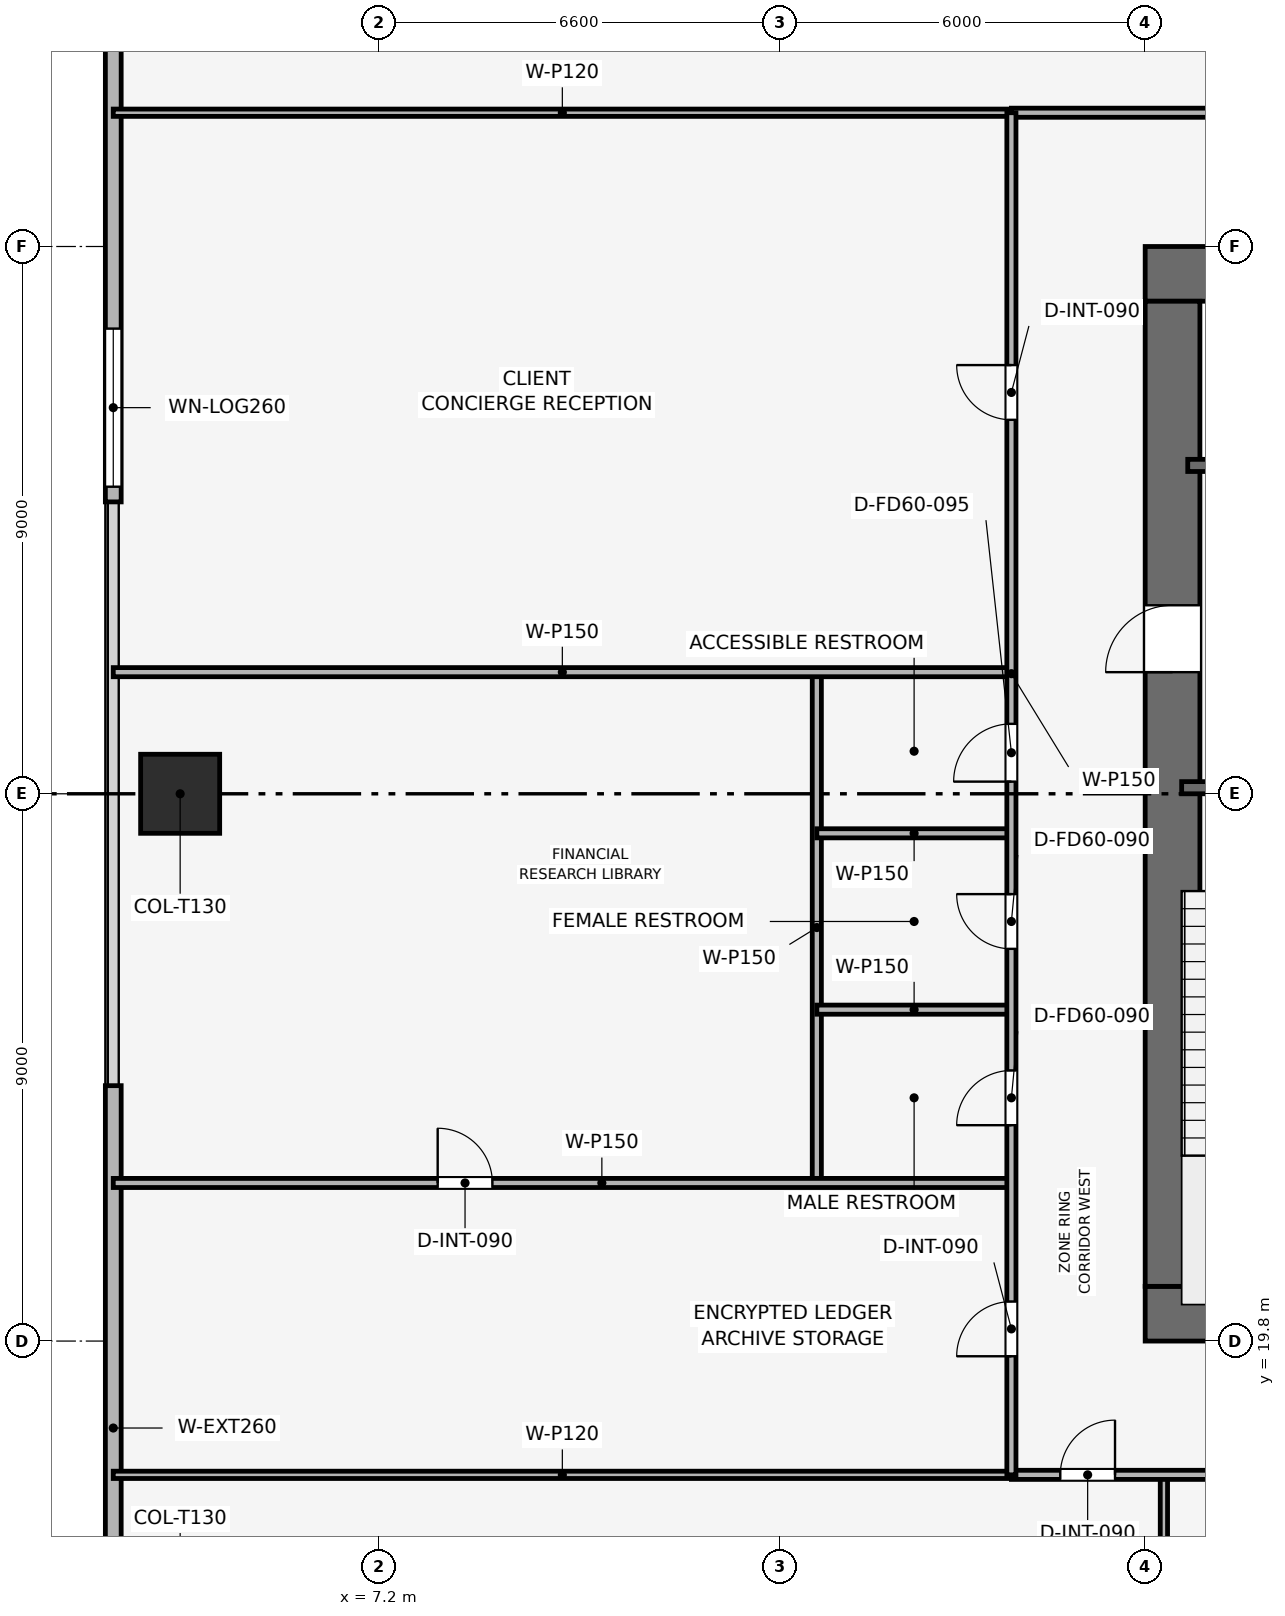
"""IFC4 building model, lengths in metres.
Left out: names, types, materials, properties, quantities, classifications, styles, units other than length and angle.
Written with IfcOpenShell. Run it as: python <this file> out.ifc"""

import sys

from ifc_helpers import new_model, si_unit, direction, frame, frame_2d, origin, origin_2d, place, context, subcontext, project, spatial, rectangle, extrude, element, fill, save


model = new_model("IFC4")
c1 = context("Model", 3, precision=1e-05, world=origin(), true_north=direction((0.0, 1.0)))
c2 = subcontext(c1, "Body", "Model", "MODEL_VIEW")
j1 = project(units=[si_unit("LENGTHUNIT", "METRE"), si_unit("PLANEANGLEUNIT", "RADIAN")], contexts=[c1])
p1 = place(None, origin())
s1 = spatial("IfcSite", under=j1, at=p1, CompositionType="ELEMENT")
p2 = place(p1, origin())
s2 = spatial("IfcBuilding", under=s1, at=p2, CompositionType="ELEMENT")
p3 = place(p2, frame((0.0, 0.0, 132.9)))
s3 = spatial("IfcBuildingStorey", under=s2, at=p3, CompositionType="ELEMENT", Elevation=132.9)
p4 = place(p3, frame((19.8, 20.25, 0.0), z_axis=(0.0, 0.0, 1.0), x_axis=(1.0, 0.0, 0.0)))
e1 = element("IfcWall", 1, at=p4, inside=s3, PredefinedType="SHEAR", context=c2, shape_type="SweptSolid", body=[
    extrude(rectangle(XDim=18.0, YDim=0.9, at=frame_2d((9.0, 0.0))), origin(), (0.0, 0.0, 1.0), 5.4),
])
p5 = place(p4, frame((8.4, 0.0, 0.0)))
e2 = element("IfcOpeningElement", 2, at=p5, cuts=e1, PredefinedType="OPENING", context=c2, shape_type="SweptSolid", body=[
    extrude(rectangle(XDim=1.2, YDim=2.2, at=frame_2d((0.6, 1.1))), frame((0.0, 0.46, 0.0), z_axis=(0.0, -1.0, 0.0), x_axis=(1.0, 0.0, 0.0)), (0.0, 0.0, 1.0), 0.92),
])
p6 = place(p3, frame((19.8, 37.35, 0.0), z_axis=(0.0, 0.0, 1.0), x_axis=(1.0, 0.0, 0.0)))
e3 = element("IfcWall", 3, at=p6, inside=s3, PredefinedType="SHEAR", context=c2, shape_type="SweptSolid", body=[
    extrude(rectangle(XDim=18.0, YDim=0.9, at=frame_2d((9.0, 0.0))), origin(), (0.0, 0.0, 1.0), 5.4),
])
p7 = place(p6, frame((7.05, 0.0, 0.0)))
e4 = element("IfcOpeningElement", 4, at=p7, cuts=e3, PredefinedType="OPENING", context=c2, shape_type="SweptSolid", body=[
    extrude(rectangle(XDim=1.1, YDim=2.15, at=frame_2d((0.55, 1.075))), frame((0.0, 0.46, 0.0), z_axis=(0.0, -1.0, 0.0), x_axis=(1.0, 0.0, 0.0)), (0.0, 0.0, 1.0), 0.92),
])
p8 = place(p3, frame((20.25, 20.7, 0.0), z_axis=(0.0, 0.0, 1.0), x_axis=(0.0, 1.0, 0.0)))
e5 = element("IfcWall", 5, at=p8, inside=s3, PredefinedType="SHEAR", context=c2, shape_type="SweptSolid", body=[
    extrude(rectangle(XDim=16.2, YDim=0.9, at=frame_2d((8.1, 0.0))), origin(), (0.0, 0.0, 1.0), 5.4),
])
p9 = place(p8, frame((10.1, 0.0, 0.0)))
e6 = element("IfcOpeningElement", 6, at=p9, cuts=e5, PredefinedType="OPENING", context=c2, shape_type="SweptSolid", body=[
    extrude(rectangle(XDim=1.1, YDim=2.15, at=frame_2d((0.55, 1.075))), frame((0.0, 0.46, 0.0), z_axis=(0.0, -1.0, 0.0), x_axis=(1.0, 0.0, 0.0)), (0.0, 0.0, 1.0), 0.92),
])
p10 = place(p3, frame((3.93, 28.8, 0.09), z_axis=(0.316171863562, 0.0, 0.948701930372), x_axis=(0.0, 1.0, 0.0)))
e7 = element("IfcColumn", 7, at=p10, inside=s3, PredefinedType="COLUMN", context=c2, shape_type="SweptSolid", body=[
    extrude(rectangle(XDim=1.3, YDim=1.3, at=origin_2d()), origin(), (0.0, 0.0, 1.0), 5.241),
])
p11 = place(p3, frame((2.83, 9.9, 0.0), z_axis=(0.0, 0.0, 1.0), x_axis=(0.0, 1.0, 0.0)))
e8 = element("IfcWall", 8, at=p11, inside=s3, PredefinedType="SOLIDWALL", context=c2, shape_type="SweptSolid", body=[
    extrude(rectangle(XDim=14.1, YDim=0.26, at=frame_2d((7.05, 0.0))), origin(), (0.0, 0.0, 1.0), 5.145),
])
p12 = place(p11, frame((0.25, 0.0, 0.9)))
e9 = element("IfcOpeningElement", 9, at=p12, cuts=e8, PredefinedType="OPENING", context=c2, shape_type="SweptSolid", body=[
    extrude(rectangle(XDim=2.6, YDim=2.2, at=frame_2d((1.3, 1.1))), frame((0.0, 0.14, 0.0), z_axis=(0.0, -1.0, 0.0), x_axis=(1.0, 0.0, 0.0)), (0.0, 0.0, 1.0), 0.28),
])
p13 = place(p3, frame((2.83, 33.6, 0.0), z_axis=(0.0, 0.0, 1.0), x_axis=(0.0, 1.0, 0.0)))
e10 = element("IfcWall", 10, at=p13, inside=s3, PredefinedType="SOLIDWALL", context=c2, shape_type="SweptSolid", body=[
    extrude(rectangle(XDim=14.1, YDim=0.26, at=frame_2d((7.05, 0.0))), origin(), (0.0, 0.0, 1.0), 5.145),
])
p14 = place(p13, frame((0.25, 0.0, 0.9)))
e11 = element("IfcOpeningElement", 11, at=p14, cuts=e10, PredefinedType="OPENING", context=c2, shape_type="SweptSolid", body=[
    extrude(rectangle(XDim=2.6, YDim=2.2, at=frame_2d((1.3, 1.1))), frame((0.0, 0.14, 0.0), z_axis=(0.0, -1.0, 0.0), x_axis=(1.0, 0.0, 0.0)), (0.0, 0.0, 1.0), 0.28),
])
p15 = place(p3, frame((20.4, 28.9, 0.0), z_axis=(0.0, 0.0, 1.0), x_axis=(1.0, 0.0, 0.0)))
e12 = element("IfcWall", 12, at=p15, inside=s3, PredefinedType="SHEAR", context=c2, shape_type="SweptSolid", body=[
    extrude(rectangle(XDim=3.15, YDim=0.2, at=frame_2d((1.575, 0.0))), origin(), (0.0, 0.0, 1.0), 5.145),
])
p16 = place(p15, frame((0.8, 0.0, 0.0)))
e13 = element("IfcOpeningElement", 13, at=p16, cuts=e12, PredefinedType="OPENING", context=c2, shape_type="SweptSolid", body=[
    extrude(rectangle(XDim=1.0, YDim=2.1, at=frame_2d((0.5, 1.05))), frame((0.0, 0.11, 0.0), z_axis=(0.0, -1.0, 0.0), x_axis=(1.0, 0.0, 0.0)), (0.0, 0.0, 1.0), 0.22),
])
p17 = place(p3, frame((20.5, 34.2, 0.0), z_axis=(0.0, 0.0, 1.0), x_axis=(1.0, 0.0, 0.0)))
e14 = element("IfcWall", 14, at=p17, inside=s3, PredefinedType="SHEAR", context=c2, shape_type="SweptSolid", body=[
    extrude(rectangle(XDim=3.05, YDim=0.2, at=frame_2d((1.525, 0.0))), origin(), (0.0, 0.0, 1.0), 5.145),
])
p18 = place(p17, frame((0.75, 0.0, 0.0)))
e15 = element("IfcOpeningElement", 15, at=p18, cuts=e14, PredefinedType="OPENING", context=c2, shape_type="SweptSolid", body=[
    extrude(rectangle(XDim=1.1, YDim=2.15, at=frame_2d((0.55, 1.075))), frame((0.0, 0.11, 0.0), z_axis=(0.0, -1.0, 0.0), x_axis=(1.0, 0.0, 0.0)), (0.0, 0.0, 1.0), 0.22),
])
for number, where, z_axis, x_axis in (
    (16, (20.108, 2.83, 0.0), (0.0, 0.0, 1.0), (0.0, 1.0, 0.0)),
    (17, (2.83, 17.6, 0.0), (0.0, 0.0, 1.0), (1.0, 0.0, 0.0)),
    (18, (2.83, 40.0, 0.0), (0.0, 0.0, 1.0), (1.0, 0.0, 0.0)),
):
    element("IfcWall", number, at=place(p3, frame(where, z_axis=z_axis, x_axis=x_axis)), inside=s3, PredefinedType="PARTITIONING", context=c2, shape_type="SweptSolid", body=[
        extrude(rectangle(XDim=14.77, YDim=0.12, at=frame_2d((7.385, 0.0))), origin(), (0.0, 0.0, 1.0), 4.63),
    ])
p19 = place(p3, frame((14.4, 22.4, 0.0), z_axis=(0.0, 0.0, 1.0), x_axis=(0.0, 1.0, 0.0)))
e19 = element("IfcWall", 19, at=p19, inside=s3, PredefinedType="PARTITIONING", context=c2, shape_type="SweptSolid", body=[
    extrude(rectangle(XDim=8.4, YDim=0.15, at=frame_2d((4.2, 0.0))), origin(), (0.0, 0.0, 1.0), 4.68),
])
p20 = place(p3, frame((2.83, 22.4, 0.0), z_axis=(0.0, 0.0, 1.0), x_axis=(1.0, 0.0, 0.0)))
e20 = element("IfcWall", 20, at=p20, inside=s3, PredefinedType="PARTITIONING", context=c2, shape_type="SweptSolid", body=[
    extrude(rectangle(XDim=14.77, YDim=0.15, at=frame_2d((7.385, 0.0))), origin(), (0.0, 0.0, 1.0), 4.63),
])
p21 = place(p20, frame((5.335, 0.0, 0.0)))
e21 = element("IfcOpeningElement", 21, at=p21, cuts=e20, PredefinedType="OPENING", context=c2, shape_type="SweptSolid", body=[
    extrude(rectangle(XDim=0.9, YDim=2.1, at=frame_2d((0.45, 1.05))), frame((0.0, 0.085, 0.0), z_axis=(0.0, -1.0, 0.0), x_axis=(1.0, 0.0, 0.0)), (0.0, 0.0, 1.0), 0.17),
])
p22 = place(p3, frame((2.83, 30.8, 0.0), z_axis=(0.0, 0.0, 1.0), x_axis=(1.0, 0.0, 0.0)))
e22 = element("IfcWall", 22, at=p22, inside=s3, PredefinedType="PARTITIONING", context=c2, shape_type="SweptSolid", body=[
    extrude(rectangle(XDim=14.77, YDim=0.15, at=frame_2d((7.385, 0.0))), origin(), (0.0, 0.0, 1.0), 4.63),
])
for number, where, z_axis, x_axis in (
    (23, (14.4, 25.25, 0.0), (0.0, 0.0, 1.0), (1.0, 0.0, 0.0)),
    (24, (14.4, 28.15, 0.0), (0.0, 0.0, 1.0), (1.0, 0.0, 0.0)),
):
    element("IfcWall", number, at=place(p3, frame(where, z_axis=z_axis, x_axis=x_axis)), inside=s3, PredefinedType="PARTITIONING", context=c2, shape_type="SweptSolid", body=[
        extrude(rectangle(XDim=3.2, YDim=0.15, at=frame_2d((1.6, 0.0))), origin(), (0.0, 0.0, 1.0), 4.77),
    ])
p23 = place(p3, frame((17.6, 17.6, 0.0), z_axis=(0.0, 0.0, 1.0), x_axis=(1.0, 0.0, 0.0)))
e25 = element("IfcWall", 25, at=p23, inside=s3, PredefinedType="PARTITIONING", context=c2, shape_type="SweptSolid", body=[
    extrude(rectangle(XDim=22.4, YDim=0.15, at=frame_2d((11.2, 0.0))), origin(), (0.0, 0.0, 1.0), 4.68),
])
p24 = place(p23, frame((0.804, 0.0, 0.0)))
e26 = element("IfcOpeningElement", 26, at=p24, cuts=e25, PredefinedType="OPENING", context=c2, shape_type="SweptSolid", body=[
    extrude(rectangle(XDim=0.9, YDim=2.1, at=frame_2d((0.45, 1.05))), frame((0.0, 0.085, 0.0), z_axis=(0.0, -1.0, 0.0), x_axis=(1.0, 0.0, 0.0)), (0.0, 0.0, 1.0), 0.17),
])
p25 = place(p23, frame((6.424, 0.0, 0.0)))
e27 = element("IfcOpeningElement", 27, at=p25, cuts=e25, PredefinedType="OPENING", context=c2, shape_type="SweptSolid", body=[
    extrude(rectangle(XDim=0.9, YDim=2.1, at=frame_2d((0.45, 1.05))), frame((0.0, 0.085, 0.0), z_axis=(0.0, -1.0, 0.0), x_axis=(1.0, 0.0, 0.0)), (0.0, 0.0, 1.0), 0.17),
])
p26 = place(p23, frame((16.369, 0.0, 0.0)))
e28 = element("IfcOpeningElement", 28, at=p26, cuts=e25, PredefinedType="OPENING", context=c2, shape_type="SweptSolid", body=[
    extrude(rectangle(XDim=0.9, YDim=2.1, at=frame_2d((0.45, 1.05))), frame((0.0, 0.085, 0.0), z_axis=(0.0, -1.0, 0.0), x_axis=(1.0, 0.0, 0.0)), (0.0, 0.0, 1.0), 0.17),
])
p27 = place(p3, frame((17.6, 40.0, 0.0), z_axis=(0.0, 0.0, 1.0), x_axis=(1.0, 0.0, 0.0)))
e29 = element("IfcWall", 29, at=p27, inside=s3, PredefinedType="PARTITIONING", context=c2, shape_type="SweptSolid", body=[
    extrude(rectangle(XDim=22.4, YDim=0.15, at=frame_2d((11.2, 0.0))), origin(), (0.0, 0.0, 1.0), 4.68),
])
p28 = place(p27, frame((10.75, 0.0, 0.0)))
e30 = element("IfcOpeningElement", 30, at=p28, cuts=e29, PredefinedType="OPENING", context=c2, shape_type="SweptSolid", body=[
    extrude(rectangle(XDim=0.9, YDim=2.1, at=frame_2d((0.45, 1.05))), frame((0.0, 0.085, 0.0), z_axis=(0.0, -1.0, 0.0), x_axis=(1.0, 0.0, 0.0)), (0.0, 0.0, 1.0), 0.17),
])
p29 = place(p3, frame((17.6, 17.6, 0.0), z_axis=(0.0, 0.0, 1.0), x_axis=(0.0, 1.0, 0.0)))
e31 = element("IfcWall", 31, at=p29, inside=s3, PredefinedType="PARTITIONING", context=c2, shape_type="SweptSolid", body=[
    extrude(rectangle(XDim=22.4, YDim=0.15, at=frame_2d((11.2, 0.0))), origin(), (0.0, 0.0, 1.0), 4.68),
])
p30 = place(p29, frame((1.95, 0.0, 0.0)))
e32 = element("IfcOpeningElement", 32, at=p30, cuts=e31, PredefinedType="OPENING", context=c2, shape_type="SweptSolid", body=[
    extrude(rectangle(XDim=0.9, YDim=2.1, at=frame_2d((0.45, 1.05))), frame((0.0, 0.085, 0.0), z_axis=(0.0, -1.0, 0.0), x_axis=(1.0, 0.0, 0.0)), (0.0, 0.0, 1.0), 0.17),
])
p31 = place(p29, frame((5.75, 0.0, 0.0)))
e33 = element("IfcOpeningElement", 33, at=p31, cuts=e31, PredefinedType="OPENING", context=c2, shape_type="SweptSolid", body=[
    extrude(rectangle(XDim=0.9, YDim=2.1, at=frame_2d((0.45, 1.05))), frame((0.0, 0.085, 0.0), z_axis=(0.0, -1.0, 0.0), x_axis=(1.0, 0.0, 0.0)), (0.0, 0.0, 1.0), 0.17),
])
p32 = place(p29, frame((8.65, 0.0, 0.0)))
e34 = element("IfcOpeningElement", 34, at=p32, cuts=e31, PredefinedType="OPENING", context=c2, shape_type="SweptSolid", body=[
    extrude(rectangle(XDim=0.9, YDim=2.1, at=frame_2d((0.45, 1.05))), frame((0.0, 0.085, 0.0), z_axis=(0.0, -1.0, 0.0), x_axis=(1.0, 0.0, 0.0)), (0.0, 0.0, 1.0), 0.17),
])
p33 = place(p29, frame((11.4, 0.0, 0.0)))
e35 = element("IfcOpeningElement", 35, at=p33, cuts=e31, PredefinedType="OPENING", context=c2, shape_type="SweptSolid", body=[
    extrude(rectangle(XDim=0.95, YDim=2.1, at=frame_2d((0.475, 1.05))), frame((0.0, 0.085, 0.0), z_axis=(0.0, -1.0, 0.0), x_axis=(1.0, 0.0, 0.0)), (0.0, 0.0, 1.0), 0.17),
])
p34 = place(p29, frame((17.35, 0.0, 0.0)))
e36 = element("IfcOpeningElement", 36, at=p34, cuts=e31, PredefinedType="OPENING", context=c2, shape_type="SweptSolid", body=[
    extrude(rectangle(XDim=0.9, YDim=2.1, at=frame_2d((0.45, 1.05))), frame((0.0, 0.085, 0.0), z_axis=(0.0, -1.0, 0.0), x_axis=(1.0, 0.0, 0.0)), (0.0, 0.0, 1.0), 0.17),
])
p35 = place(p14, origin())
e37 = element("IfcWindow", 37, at=p35, inside=s3, PartitioningType="SINGLE_PANEL", PredefinedType="WINDOW", context=c2, shape_type="SweptSolid", body=[
    extrude(rectangle(XDim=2.6, YDim=2.2, at=frame_2d((1.3, 1.1))), frame((0.0, 0.03, 0.0), z_axis=(0.0, -1.0, 0.0), x_axis=(1.0, 0.0, 0.0)), (0.0, 0.0, 1.0), 0.06),
])
fill(e11, e37)
p36 = place(p21, origin())
e38 = element("IfcDoor", 38, at=p36, inside=s3, OperationType="SINGLE_SWING_LEFT", PredefinedType="DOOR", context=c2, shape_type="SweptSolid", body=[
    extrude(rectangle(XDim=0.9, YDim=2.1, at=frame_2d((0.45, 1.05))), frame((0.0, 0.025, 0.0), z_axis=(0.0, -1.0, 0.0), x_axis=(1.0, 0.0, 0.0)), (0.0, 0.0, 1.0), 0.05),
])
fill(e21, e38)
p37 = place(p24, origin())
e39 = element("IfcDoor", 39, at=p37, inside=s3, OperationType="SINGLE_SWING_RIGHT", PredefinedType="DOOR", context=c2, shape_type="SweptSolid", body=[
    extrude(rectangle(XDim=0.9, YDim=2.1, at=frame_2d((0.45, 1.05))), frame((0.0, 0.025, 0.0), z_axis=(0.0, -1.0, 0.0), x_axis=(1.0, 0.0, 0.0)), (0.0, 0.0, 1.0), 0.05),
])
fill(e26, e39)
p38 = place(p30, origin())
e40 = element("IfcDoor", 40, at=p38, inside=s3, OperationType="SINGLE_SWING_LEFT", PredefinedType="DOOR", context=c2, shape_type="SweptSolid", body=[
    extrude(rectangle(XDim=0.9, YDim=2.1, at=frame_2d((0.45, 1.05))), frame((0.0, 0.025, 0.0), z_axis=(0.0, -1.0, 0.0), x_axis=(1.0, 0.0, 0.0)), (0.0, 0.0, 1.0), 0.05),
])
fill(e32, e40)
p39 = place(p31, origin())
e41 = element("IfcDoor", 41, at=p39, inside=s3, OperationType="SINGLE_SWING_LEFT", PredefinedType="DOOR", context=c2, shape_type="SweptSolid", body=[
    extrude(rectangle(XDim=0.9, YDim=2.1, at=frame_2d((0.45, 1.05))), frame((0.0, 0.025, 0.0), z_axis=(0.0, -1.0, 0.0), x_axis=(1.0, 0.0, 0.0)), (0.0, 0.0, 1.0), 0.05),
])
fill(e33, e41)
p40 = place(p32, origin())
e42 = element("IfcDoor", 42, at=p40, inside=s3, OperationType="SINGLE_SWING_RIGHT", PredefinedType="DOOR", context=c2, shape_type="SweptSolid", body=[
    extrude(rectangle(XDim=0.9, YDim=2.1, at=frame_2d((0.45, 1.05))), frame((0.0, 0.025, 0.0), z_axis=(0.0, -1.0, 0.0), x_axis=(1.0, 0.0, 0.0)), (0.0, 0.0, 1.0), 0.05),
])
fill(e34, e42)
p41 = place(p33, origin())
e43 = element("IfcDoor", 43, at=p41, inside=s3, OperationType="SINGLE_SWING_LEFT", PredefinedType="DOOR", context=c2, shape_type="SweptSolid", body=[
    extrude(rectangle(XDim=0.95, YDim=2.1, at=frame_2d((0.475, 1.05))), frame((0.0, 0.025, 0.0), z_axis=(0.0, -1.0, 0.0), x_axis=(1.0, 0.0, 0.0)), (0.0, 0.0, 1.0), 0.05),
])
fill(e35, e43)
p42 = place(p34, origin())
e44 = element("IfcDoor", 44, at=p42, inside=s3, OperationType="SINGLE_SWING_RIGHT", PredefinedType="DOOR", context=c2, shape_type="SweptSolid", body=[
    extrude(rectangle(XDim=0.9, YDim=2.1, at=frame_2d((0.45, 1.05))), frame((0.0, 0.025, 0.0), z_axis=(0.0, -1.0, 0.0), x_axis=(1.0, 0.0, 0.0)), (0.0, 0.0, 1.0), 0.05),
])
fill(e36, e44)
p43 = place(p9, origin())
e45 = element("IfcDoor", 45, at=p43, inside=s3, OperationType="SINGLE_SWING_LEFT", PredefinedType="DOOR", context=c2, shape_type="SweptSolid", body=[
    extrude(rectangle(XDim=1.1, YDim=2.15, at=frame_2d((0.55, 1.075))), frame((0.0, 0.025, 0.0), z_axis=(0.0, -1.0, 0.0), x_axis=(1.0, 0.0, 0.0)), (0.0, 0.0, 1.0), 0.05),
])
fill(e6, e45)
save(model, sys.argv[1])
